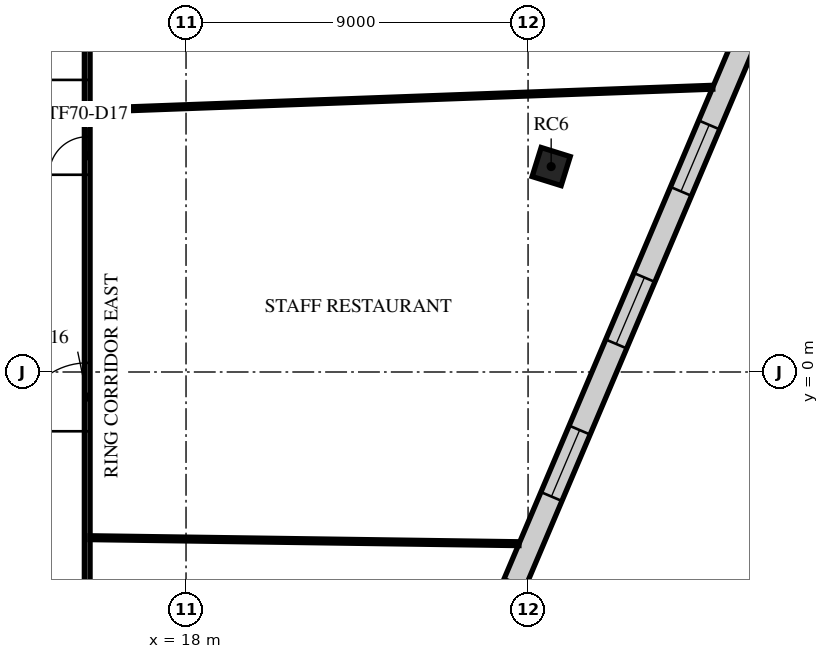
"""IFC4 building model, lengths in metres.
Left out: names, types, materials, properties, quantities, classifications, styles, units other than length and angle.
Written with IfcOpenShell. Run it as: python <this file> out.ifc"""

import sys

from ifc_helpers import new_model, si_unit, direction, frame, frame_2d, origin, origin_2d, place, context, subcontext, project, spatial, rectangle, extrude, element, fill, save


model = new_model("IFC4")
c1 = context("Model", 3, precision=1e-05, world=origin(), true_north=direction((0.0, 1.0)))
c2 = subcontext(c1, "Body", "Model", "MODEL_VIEW")
j1 = project(units=[si_unit("LENGTHUNIT", "METRE"), si_unit("PLANEANGLEUNIT", "RADIAN")], contexts=[c1])
p1 = place(None, origin())
s1 = spatial("IfcSite", under=j1, at=p1, CompositionType="ELEMENT")
p2 = place(p1, origin())
s2 = spatial("IfcBuilding", under=s1, at=p2, CompositionType="ELEMENT")
p3 = place(p2, frame((0.0, 0.0, 300.5)))
s3 = spatial("IfcBuildingStorey", under=s2, at=p3, CompositionType="ELEMENT", Elevation=300.5)
p4 = place(p3, frame((27.608, 5.406, 0.0), z_axis=(0.0, 0.0, 1.0), x_axis=(0.297503182032, 0.954720826567, 0.0)))
e1 = element("IfcColumn", 1, at=p4, inside=s3, PredefinedType="COLUMN", context=c2, shape_type="SweptSolid", body=[
    extrude(rectangle(XDim=0.8, YDim=0.8, at=origin_2d()), origin(), (0.0, 0.0, 1.0), 4.0),
])
p5 = place(p3, frame((15.204, -32.515, 0.0), z_axis=(0.0, 0.0, 1.0), x_axis=(0.390728997462, 0.920505758017, 0.0)))
e2 = element("IfcWall", 2, at=p5, inside=s3, PredefinedType="STANDARD", context=c2, shape_type="SweptSolid", body=[
    extrude(rectangle(XDim=47.979, YDim=0.6, at=frame_2d((23.99, 0.0))), origin(), (0.0, 0.0, 1.0), 3.65),
])
p6 = place(p5, frame((1.231, 0.0, 0.9)))
e3 = element("IfcOpeningElement", 3, at=p6, cuts=e2, PredefinedType="OPENING", context=c2, shape_type="SweptSolid", body=[
    extrude(rectangle(XDim=1.9, YDim=2.1, at=frame_2d((0.95, 1.05))), frame((0.0, 0.31, 0.0), z_axis=(0.0, -1.0, 0.0), x_axis=(1.0, 0.0, 0.0)), (0.0, 0.0, 1.0), 0.62),
])
p7 = place(p5, frame((5.593, 0.0, 0.9)))
e4 = element("IfcOpeningElement", 4, at=p7, cuts=e2, PredefinedType="OPENING", context=c2, shape_type="SweptSolid", body=[
    extrude(rectangle(XDim=1.9, YDim=2.1, at=frame_2d((0.95, 1.05))), frame((0.0, 0.31, 0.0), z_axis=(0.0, -1.0, 0.0), x_axis=(1.0, 0.0, 0.0)), (0.0, 0.0, 1.0), 0.62),
])
p8 = place(p5, frame((9.954, 0.0, 0.9)))
e5 = element("IfcOpeningElement", 5, at=p8, cuts=e2, PredefinedType="OPENING", context=c2, shape_type="SweptSolid", body=[
    extrude(rectangle(XDim=1.9, YDim=2.1, at=frame_2d((0.95, 1.05))), frame((0.0, 0.31, 0.0), z_axis=(0.0, -1.0, 0.0), x_axis=(1.0, 0.0, 0.0)), (0.0, 0.0, 1.0), 0.62),
])
p9 = place(p5, frame((14.316, 0.0, 0.9)))
e6 = element("IfcOpeningElement", 6, at=p9, cuts=e2, PredefinedType="OPENING", context=c2, shape_type="SweptSolid", body=[
    extrude(rectangle(XDim=1.9, YDim=2.1, at=frame_2d((0.95, 1.05))), frame((0.0, 0.31, 0.0), z_axis=(0.0, -1.0, 0.0), x_axis=(1.0, 0.0, 0.0)), (0.0, 0.0, 1.0), 0.62),
])
p10 = place(p5, frame((18.678, 0.0, 0.9)))
e7 = element("IfcOpeningElement", 7, at=p10, cuts=e2, PredefinedType="OPENING", context=c2, shape_type="SweptSolid", body=[
    extrude(rectangle(XDim=1.9, YDim=2.1, at=frame_2d((0.95, 1.05))), frame((0.0, 0.31, 0.0), z_axis=(0.0, -1.0, 0.0), x_axis=(1.0, 0.0, 0.0)), (0.0, 0.0, 1.0), 0.62),
])
p11 = place(p5, frame((23.04, 0.0, 0.9)))
e8 = element("IfcOpeningElement", 8, at=p11, cuts=e2, PredefinedType="OPENING", context=c2, shape_type="SweptSolid", body=[
    extrude(rectangle(XDim=1.9, YDim=2.1, at=frame_2d((0.95, 1.05))), frame((0.0, 0.31, 0.0), z_axis=(0.0, -1.0, 0.0), x_axis=(1.0, 0.0, 0.0)), (0.0, 0.0, 1.0), 0.62),
])
p12 = place(p5, frame((27.401, 0.0, 0.9)))
e9 = element("IfcOpeningElement", 9, at=p12, cuts=e2, PredefinedType="OPENING", context=c2, shape_type="SweptSolid", body=[
    extrude(rectangle(XDim=1.9, YDim=2.1, at=frame_2d((0.95, 1.05))), frame((0.0, 0.31, 0.0), z_axis=(0.0, -1.0, 0.0), x_axis=(1.0, 0.0, 0.0)), (0.0, 0.0, 1.0), 0.62),
])
p13 = place(p5, frame((31.763, 0.0, 0.9)))
e10 = element("IfcOpeningElement", 10, at=p13, cuts=e2, PredefinedType="OPENING", context=c2, shape_type="SweptSolid", body=[
    extrude(rectangle(XDim=1.9, YDim=2.1, at=frame_2d((0.95, 1.05))), frame((0.0, 0.31, 0.0), z_axis=(0.0, -1.0, 0.0), x_axis=(1.0, 0.0, 0.0)), (0.0, 0.0, 1.0), 0.62),
])
p14 = place(p5, frame((36.125, 0.0, 0.9)))
e11 = element("IfcOpeningElement", 11, at=p14, cuts=e2, PredefinedType="OPENING", context=c2, shape_type="SweptSolid", body=[
    extrude(rectangle(XDim=1.9, YDim=2.1, at=frame_2d((0.95, 1.05))), frame((0.0, 0.31, 0.0), z_axis=(0.0, -1.0, 0.0), x_axis=(1.0, 0.0, 0.0)), (0.0, 0.0, 1.0), 0.62),
])
p15 = place(p5, frame((40.487, 0.0, 0.9)))
e12 = element("IfcOpeningElement", 12, at=p15, cuts=e2, PredefinedType="OPENING", context=c2, shape_type="SweptSolid", body=[
    extrude(rectangle(XDim=1.9, YDim=2.1, at=frame_2d((0.95, 1.05))), frame((0.0, 0.31, 0.0), z_axis=(0.0, -1.0, 0.0), x_axis=(1.0, 0.0, 0.0)), (0.0, 0.0, 1.0), 0.62),
])
p16 = place(p5, frame((44.848, 0.0, 0.9)))
e13 = element("IfcOpeningElement", 13, at=p16, cuts=e2, PredefinedType="OPENING", context=c2, shape_type="SweptSolid", body=[
    extrude(rectangle(XDim=1.9, YDim=2.1, at=frame_2d((0.95, 1.05))), frame((0.0, 0.31, 0.0), z_axis=(0.0, -1.0, 0.0), x_axis=(1.0, 0.0, 0.0)), (0.0, 0.0, 1.0), 0.62),
])
p17 = place(p3, frame((15.4, -12.4, 0.0), z_axis=(0.0, 0.0, 1.0), x_axis=(0.0, 1.0, 0.0)))
e14 = element("IfcWall", 14, at=p17, inside=s3, PredefinedType="PARTITIONING", context=c2, shape_type="SweptSolid", body=[
    extrude(rectangle(XDim=24.725, YDim=0.15, at=frame_2d((12.362, 0.0))), origin(), (0.0, 0.0, 1.0), 3.25),
])
p18 = place(p17, frame((2.8, 0.0, 0.0)))
e15 = element("IfcOpeningElement", 15, at=p18, cuts=e14, PredefinedType="OPENING", context=c2, shape_type="SweptSolid", body=[
    extrude(rectangle(XDim=1.8, YDim=2.1, at=frame_2d((0.9, 1.05))), frame((0.0, 0.085, 0.0), z_axis=(0.0, -1.0, 0.0), x_axis=(1.0, 0.0, 0.0)), (0.0, 0.0, 1.0), 0.17),
])
p19 = place(p17, frame((10.84, 0.0, 0.0)))
e16 = element("IfcOpeningElement", 16, at=p19, cuts=e14, PredefinedType="OPENING", context=c2, shape_type="SweptSolid", body=[
    extrude(rectangle(XDim=1.8, YDim=2.1, at=frame_2d((0.9, 1.05))), frame((0.0, 0.085, 0.0), z_axis=(0.0, -1.0, 0.0), x_axis=(1.0, 0.0, 0.0)), (0.0, 0.0, 1.0), 0.17),
])
p20 = place(p17, frame((17.59, 0.0, 0.0)))
e17 = element("IfcOpeningElement", 17, at=p20, cuts=e14, PredefinedType="OPENING", context=c2, shape_type="SweptSolid", body=[
    extrude(rectangle(XDim=1.0, YDim=2.1, at=frame_2d((0.5, 1.05))), frame((0.0, 0.085, 0.0), z_axis=(0.0, -1.0, 0.0), x_axis=(1.0, 0.0, 0.0)), (0.0, 0.0, 1.0), 0.17),
])
p21 = place(p17, frame((20.086, 0.0, 0.0)))
e18 = element("IfcOpeningElement", 18, at=p21, cuts=e14, PredefinedType="OPENING", context=c2, shape_type="SweptSolid", body=[
    extrude(rectangle(XDim=1.8, YDim=2.1, at=frame_2d((0.9, 1.05))), frame((0.0, 0.085, 0.0), z_axis=(0.0, -1.0, 0.0), x_axis=(1.0, 0.0, 0.0)), (0.0, 0.0, 1.0), 0.17),
])
p22 = place(p3, frame((15.476, -4.36, 0.0), z_axis=(0.0, 0.0, 1.0), x_axis=(0.999902345391, -0.013974966252, 0.0)))
e19 = element("IfcWall", 19, at=p22, inside=s3, PredefinedType="PARTITIONING", context=c2, shape_type="SweptSolid", body=[
    extrude(rectangle(XDim=11.286, YDim=0.1, at=frame_2d((5.643, 0.0))), origin(), (0.0, 0.0, 1.0), 3.65),
])
p23 = place(p3, frame((15.477, 6.889, 0.0), z_axis=(0.0, 0.0, 1.0), x_axis=(0.999319883967, 0.036875052648, 0.0)))
e20 = element("IfcWall", 20, at=p23, inside=s3, PredefinedType="PARTITIONING", context=c2, shape_type="SweptSolid", body=[
    extrude(rectangle(XDim=16.393, YDim=0.1, at=frame_2d((8.197, 0.0))), origin(), (0.0, 0.0, 1.0), 3.65),
])
p24 = place(p13, origin())
e21 = element("IfcWindow", 21, at=p24, inside=s3, PartitioningType="SINGLE_PANEL", PredefinedType="WINDOW", context=c2, shape_type="SweptSolid", body=[
    extrude(rectangle(XDim=1.9, YDim=2.1, at=frame_2d((0.95, 1.05))), frame((0.0, 0.03, 0.0), z_axis=(0.0, -1.0, 0.0), x_axis=(1.0, 0.0, 0.0)), (0.0, 0.0, 1.0), 0.06),
])
fill(e10, e21)
p25 = place(p14, origin())
e22 = element("IfcWindow", 22, at=p25, inside=s3, PartitioningType="SINGLE_PANEL", PredefinedType="WINDOW", context=c2, shape_type="SweptSolid", body=[
    extrude(rectangle(XDim=1.9, YDim=2.1, at=frame_2d((0.95, 1.05))), frame((0.0, 0.03, 0.0), z_axis=(0.0, -1.0, 0.0), x_axis=(1.0, 0.0, 0.0)), (0.0, 0.0, 1.0), 0.06),
])
fill(e11, e22)
p26 = place(p15, origin())
e23 = element("IfcWindow", 23, at=p26, inside=s3, PartitioningType="SINGLE_PANEL", PredefinedType="WINDOW", context=c2, shape_type="SweptSolid", body=[
    extrude(rectangle(XDim=1.9, YDim=2.1, at=frame_2d((0.95, 1.05))), frame((0.0, 0.03, 0.0), z_axis=(0.0, -1.0, 0.0), x_axis=(1.0, 0.0, 0.0)), (0.0, 0.0, 1.0), 0.06),
])
fill(e12, e23)
p27 = place(p19, frame((1.8, 0.0, 0.0), z_axis=(0.0, 0.0, 1.0), x_axis=(-1.0, 0.0, 0.0)))
e24 = element("IfcDoor", 24, at=p27, inside=s3, OperationType="DOUBLE_DOOR_SINGLE_SWING", PredefinedType="DOOR", context=c2, shape_type="SweptSolid", body=[
    extrude(rectangle(XDim=1.8, YDim=2.1, at=frame_2d((0.9, 1.05))), frame((0.0, 0.025, 0.0), z_axis=(0.0, -1.0, 0.0), x_axis=(1.0, 0.0, 0.0)), (0.0, 0.0, 1.0), 0.05),
])
fill(e16, e24)
p28 = place(p20, frame((1.0, 0.0, 0.0), z_axis=(0.0, 0.0, 1.0), x_axis=(-1.0, 0.0, 0.0)))
e25 = element("IfcDoor", 25, at=p28, inside=s3, OperationType="SINGLE_SWING_LEFT", PredefinedType="DOOR", context=c2, shape_type="SweptSolid", body=[
    extrude(rectangle(XDim=1.0, YDim=2.1, at=frame_2d((0.5, 1.05))), frame((0.0, 0.025, 0.0), z_axis=(0.0, -1.0, 0.0), x_axis=(1.0, 0.0, 0.0)), (0.0, 0.0, 1.0), 0.05),
])
fill(e17, e25)
p29 = place(p21, frame((1.8, 0.0, 0.0), z_axis=(0.0, 0.0, 1.0), x_axis=(-1.0, 0.0, 0.0)))
e26 = element("IfcDoor", 26, at=p29, inside=s3, OperationType="DOUBLE_DOOR_SINGLE_SWING", PredefinedType="DOOR", context=c2, shape_type="SweptSolid", body=[
    extrude(rectangle(XDim=1.8, YDim=2.1, at=frame_2d((0.9, 1.05))), frame((0.0, 0.025, 0.0), z_axis=(0.0, -1.0, 0.0), x_axis=(1.0, 0.0, 0.0)), (0.0, 0.0, 1.0), 0.05),
])
fill(e18, e26)
save(model, sys.argv[1])
